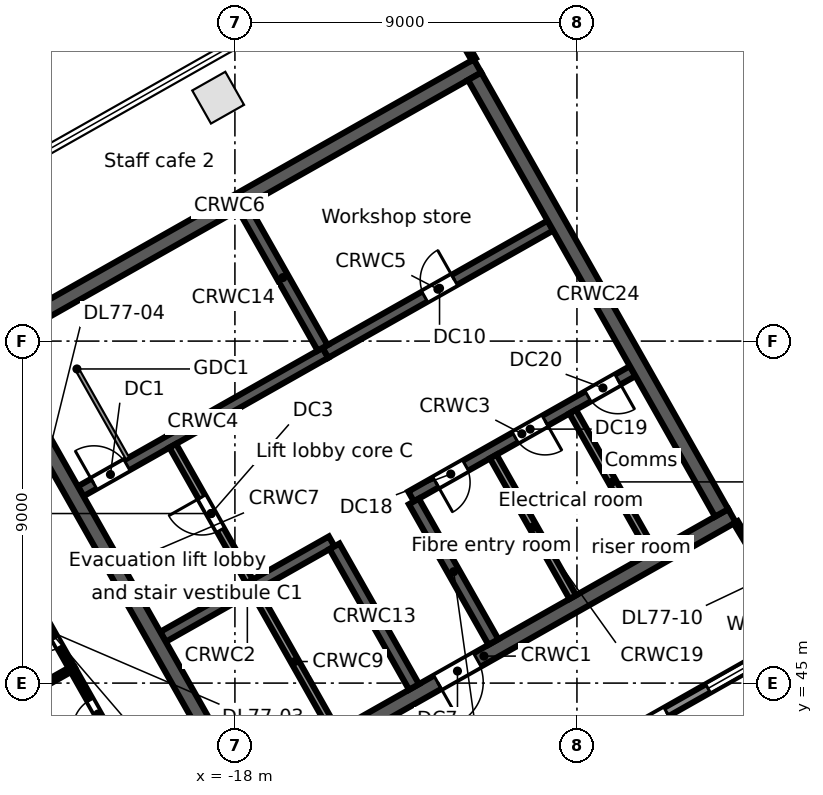
"""IFC4 building model, lengths in metres.
Left out: names, types, materials, properties, quantities, classifications, styles, units other than length and angle.
Written with IfcOpenShell. Run it as: python <this file> out.ifc"""

import sys

from ifc_helpers import new_model, si_unit, direction, frame, frame_2d, origin, origin_2d, place, context, subcontext, project, spatial, rectangle, extrude, element, fill, save


model = new_model("IFC4")
c1 = context("Model", 3, precision=1e-05, world=origin(), true_north=direction((0.0, 1.0)))
c2 = subcontext(c1, "Body", "Model", "MODEL_VIEW")
j1 = project(units=[si_unit("LENGTHUNIT", "METRE"), si_unit("PLANEANGLEUNIT", "RADIAN")], contexts=[c1])
p1 = place(None, origin())
s1 = spatial("IfcSite", under=j1, at=p1, CompositionType="ELEMENT")
p2 = place(p1, origin())
s2 = spatial("IfcBuilding", under=s1, at=p2, CompositionType="ELEMENT")
p3 = place(p2, frame((0.0, 0.0, 343.1)))
s3 = spatial("IfcBuildingStorey", under=s2, at=p3, CompositionType="ELEMENT", Elevation=343.1)
p4 = place(p3, frame((-18.441, 60.406, 0.0), z_axis=(0.0, 0.0, 1.0), x_axis=(-0.87035569594, -0.492423560103, 0.0)))
e1 = element("IfcColumn", 1, at=p4, inside=s3, PredefinedType="COLUMN", context=c2, shape_type="SweptSolid", body=[
    extrude(rectangle(XDim=1.0, YDim=1.0, at=origin_2d()), origin(), (0.0, 0.0, 1.0), 3.5),
])
p5 = place(p3, frame((-3.017, 46.293, 0.0), z_axis=(0.0, 0.0, 1.0), x_axis=(-0.870355474887, -0.492423950812, 0.0)))
e2 = element("IfcWall", 2, at=p5, inside=s3, PredefinedType="STANDARD", context=c2, shape_type="SweptSolid", body=[
    extrude(rectangle(XDim=40.34, YDim=0.25, at=frame_2d((20.17, 0.0))), origin(), (0.0, 0.0, 1.0), 3.5),
])
p6 = place(p5, frame((37.428, 0.0, 0.8)))
e3 = element("IfcOpeningElement", 3, at=p6, cuts=e2, PredefinedType="OPENING", context=c2, shape_type="SweptSolid", body=[
    extrude(rectangle(XDim=2.4, YDim=2.2, at=frame_2d((1.2, 1.1))), frame((0.0, 0.135, 0.0), z_axis=(0.0, -1.0, 0.0), x_axis=(1.0, 0.0, 0.0)), (0.0, 0.0, 1.0), 0.27),
])
p7 = place(p5, frame((34.372, 0.0, 0.0)))
e4 = element("IfcOpeningElement", 4, at=p7, cuts=e2, PredefinedType="OPENING", context=c2, shape_type="SweptSolid", body=[
    extrude(rectangle(XDim=1.8, YDim=2.4, at=frame_2d((0.9, 1.2))), frame((0.0, 0.135, 0.0), z_axis=(0.0, -1.0, 0.0), x_axis=(1.0, 0.0, 0.0)), (0.0, 0.0, 1.0), 0.27),
])
p8 = place(p5, frame((30.716, 0.0, 0.8)))
e5 = element("IfcOpeningElement", 5, at=p8, cuts=e2, PredefinedType="OPENING", context=c2, shape_type="SweptSolid", body=[
    extrude(rectangle(XDim=2.4, YDim=2.2, at=frame_2d((1.2, 1.1))), frame((0.0, 0.135, 0.0), z_axis=(0.0, -1.0, 0.0), x_axis=(1.0, 0.0, 0.0)), (0.0, 0.0, 1.0), 0.27),
])
p9 = place(p5, frame((27.36, 0.0, 0.8)))
e6 = element("IfcOpeningElement", 6, at=p9, cuts=e2, PredefinedType="OPENING", context=c2, shape_type="SweptSolid", body=[
    extrude(rectangle(XDim=2.4, YDim=2.2, at=frame_2d((1.2, 1.1))), frame((0.0, 0.135, 0.0), z_axis=(0.0, -1.0, 0.0), x_axis=(1.0, 0.0, 0.0)), (0.0, 0.0, 1.0), 0.27),
])
p10 = place(p5, frame((24.304, 0.0, 0.0)))
e7 = element("IfcOpeningElement", 7, at=p10, cuts=e2, PredefinedType="OPENING", context=c2, shape_type="SweptSolid", body=[
    extrude(rectangle(XDim=1.8, YDim=2.4, at=frame_2d((0.9, 1.2))), frame((0.0, 0.135, 0.0), z_axis=(0.0, -1.0, 0.0), x_axis=(1.0, 0.0, 0.0)), (0.0, 0.0, 1.0), 0.27),
])
p11 = place(p5, frame((20.648, 0.0, 0.8)))
e8 = element("IfcOpeningElement", 8, at=p11, cuts=e2, PredefinedType="OPENING", context=c2, shape_type="SweptSolid", body=[
    extrude(rectangle(XDim=2.4, YDim=2.2, at=frame_2d((1.2, 1.1))), frame((0.0, 0.135, 0.0), z_axis=(0.0, -1.0, 0.0), x_axis=(1.0, 0.0, 0.0)), (0.0, 0.0, 1.0), 0.27),
])
p12 = place(p5, frame((17.292, 0.0, 0.8)))
e9 = element("IfcOpeningElement", 9, at=p12, cuts=e2, PredefinedType="OPENING", context=c2, shape_type="SweptSolid", body=[
    extrude(rectangle(XDim=2.4, YDim=2.2, at=frame_2d((1.2, 1.1))), frame((0.0, 0.135, 0.0), z_axis=(0.0, -1.0, 0.0), x_axis=(1.0, 0.0, 0.0)), (0.0, 0.0, 1.0), 0.27),
])
p13 = place(p5, frame((14.236, 0.0, 0.0)))
e10 = element("IfcOpeningElement", 10, at=p13, cuts=e2, PredefinedType="OPENING", context=c2, shape_type="SweptSolid", body=[
    extrude(rectangle(XDim=1.8, YDim=2.4, at=frame_2d((0.9, 1.2))), frame((0.0, 0.135, 0.0), z_axis=(0.0, -1.0, 0.0), x_axis=(1.0, 0.0, 0.0)), (0.0, 0.0, 1.0), 0.27),
])
p14 = place(p5, frame((10.58, 0.0, 0.8)))
e11 = element("IfcOpeningElement", 11, at=p14, cuts=e2, PredefinedType="OPENING", context=c2, shape_type="SweptSolid", body=[
    extrude(rectangle(XDim=2.4, YDim=2.2, at=frame_2d((1.2, 1.1))), frame((0.0, 0.135, 0.0), z_axis=(0.0, -1.0, 0.0), x_axis=(1.0, 0.0, 0.0)), (0.0, 0.0, 1.0), 0.27),
])
p15 = place(p5, frame((7.224, 0.0, 0.8)))
e12 = element("IfcOpeningElement", 12, at=p15, cuts=e2, PredefinedType="OPENING", context=c2, shape_type="SweptSolid", body=[
    extrude(rectangle(XDim=2.4, YDim=2.2, at=frame_2d((1.2, 1.1))), frame((0.0, 0.135, 0.0), z_axis=(0.0, -1.0, 0.0), x_axis=(1.0, 0.0, 0.0)), (0.0, 0.0, 1.0), 0.27),
])
p16 = place(p5, frame((4.168, 0.0, 0.0)))
e13 = element("IfcOpeningElement", 13, at=p16, cuts=e2, PredefinedType="OPENING", context=c2, shape_type="SweptSolid", body=[
    extrude(rectangle(XDim=1.8, YDim=2.4, at=frame_2d((0.9, 1.2))), frame((0.0, 0.135, 0.0), z_axis=(0.0, -1.0, 0.0), x_axis=(1.0, 0.0, 0.0)), (0.0, 0.0, 1.0), 0.27),
])
p17 = place(p5, frame((0.512, 0.0, 0.8)))
e14 = element("IfcOpeningElement", 14, at=p17, cuts=e2, PredefinedType="OPENING", context=c2, shape_type="SweptSolid", body=[
    extrude(rectangle(XDim=2.4, YDim=2.2, at=frame_2d((1.2, 1.1))), frame((0.0, 0.135, 0.0), z_axis=(0.0, -1.0, 0.0), x_axis=(1.0, 0.0, 0.0)), (0.0, 0.0, 1.0), 0.27),
])
p18 = place(p3, frame((-17.975, 42.017, 0.0), z_axis=(0.0, 0.0, 1.0), x_axis=(0.87034965173, 0.492434243055, 0.0)))
e15 = element("IfcWall", 15, at=p18, inside=s3, PredefinedType="SOLIDWALL", context=c2, shape_type="SweptSolid", body=[
    extrude(rectangle(XDim=15.0, YDim=0.4, at=frame_2d((7.5, 0.0))), origin(), (0.0, 0.0, 1.0), 3.5),
])
p19 = place(p18, frame((6.1, 0.0, 0.0)))
e16 = element("IfcOpeningElement", 16, at=p19, cuts=e15, PredefinedType="OPENING", context=c2, shape_type="SweptSolid", body=[
    extrude(rectangle(XDim=1.2, YDim=2.1, at=frame_2d((0.6, 1.05))), frame((0.0, 0.21, 0.0), z_axis=(0.0, -1.0, 0.0), x_axis=(1.0, 0.0, 0.0)), (0.0, 0.0, 1.0), 0.42),
])
p20 = place(p3, frame((-19.892, 46.218, 0.0), z_axis=(0.0, 0.0, 1.0), x_axis=(0.870341639186, 0.492448404505, 0.0)))
e17 = element("IfcWall", 17, at=p20, inside=s3, PredefinedType="SOLIDWALL", context=c2, shape_type="SweptSolid", body=[
    extrude(rectangle(XDim=5.1, YDim=0.3, at=frame_2d((2.55, 0.0))), origin(), (0.0, 0.0, 1.0), 3.5),
])
p21 = place(p3, frame((-13.365, 49.911, 0.0), z_axis=(0.0, 0.0, 1.0), x_axis=(0.870347618718, 0.492437836272, 0.0)))
e18 = element("IfcWall", 18, at=p21, inside=s3, PredefinedType="SOLIDWALL", context=c2, shape_type="SweptSolid", body=[
    extrude(rectangle(XDim=6.7, YDim=0.3, at=frame_2d((3.35, 0.0))), origin(), (0.0, 0.0, 1.0), 3.5),
])
p22 = place(p21, frame((0.75, 0.0, 0.0)))
e19 = element("IfcOpeningElement", 19, at=p22, cuts=e18, PredefinedType="OPENING", context=c2, shape_type="SweptSolid", body=[
    extrude(rectangle(XDim=0.9, YDim=2.1, at=frame_2d((0.45, 1.05))), frame((0.0, 0.16, 0.0), z_axis=(0.0, -1.0, 0.0), x_axis=(1.0, 0.0, 0.0)), (0.0, 0.0, 1.0), 0.32),
])
p23 = place(p21, frame((3.15, 0.0, 0.0)))
e20 = element("IfcOpeningElement", 20, at=p23, cuts=e18, PredefinedType="OPENING", context=c2, shape_type="SweptSolid", body=[
    extrude(rectangle(XDim=0.9, YDim=2.1, at=frame_2d((0.45, 1.05))), frame((0.0, 0.16, 0.0), z_axis=(0.0, -1.0, 0.0), x_axis=(1.0, 0.0, 0.0)), (0.0, 0.0, 1.0), 0.32),
])
p24 = place(p21, frame((5.35, 0.0, 0.0)))
e21 = element("IfcOpeningElement", 21, at=p24, cuts=e18, PredefinedType="OPENING", context=c2, shape_type="SweptSolid", body=[
    extrude(rectangle(XDim=0.9, YDim=2.1, at=frame_2d((0.45, 1.05))), frame((0.0, 0.16, 0.0), z_axis=(0.0, -1.0, 0.0), x_axis=(1.0, 0.0, 0.0)), (0.0, 0.0, 1.0), 0.32),
])
p25 = place(p3, frame((-22.059, 50.047, 0.0), z_axis=(0.0, 0.0, 1.0), x_axis=(0.87035077051, 0.49243226567, 0.0)))
e22 = element("IfcWall", 22, at=p25, inside=s3, PredefinedType="SOLIDWALL", context=c2, shape_type="SweptSolid", body=[
    extrude(rectangle(XDim=7.4, YDim=0.3, at=frame_2d((3.7, 0.0))), origin(), (0.0, 0.0, 1.0), 3.5),
])
p26 = place(p25, frame((0.4, 0.0, 0.0)))
e23 = element("IfcOpeningElement", 23, at=p26, cuts=e22, PredefinedType="OPENING", context=c2, shape_type="SweptSolid", body=[
    extrude(rectangle(XDim=1.0, YDim=2.1, at=frame_2d((0.5, 1.05))), frame((0.0, 0.16, 0.0), z_axis=(0.0, -1.0, 0.0), x_axis=(1.0, 0.0, 0.0)), (0.0, 0.0, 1.0), 0.32),
])
p27 = place(p3, frame((-15.618, 53.691, 0.0), z_axis=(0.0, 0.0, 1.0), x_axis=(0.870362830851, 0.492410948978, 0.0)))
e24 = element("IfcWall", 24, at=p27, inside=s3, PredefinedType="SOLIDWALL", context=c2, shape_type="SweptSolid", body=[
    extrude(rectangle(XDim=6.8, YDim=0.3, at=frame_2d((3.4, 0.0))), origin(), (0.0, 0.0, 1.0), 3.5),
])
p28 = place(p27, frame((3.0, 0.0, 0.0)))
e25 = element("IfcOpeningElement", 25, at=p28, cuts=e24, PredefinedType="OPENING", context=c2, shape_type="SweptSolid", body=[
    extrude(rectangle(XDim=0.9, YDim=2.1, at=frame_2d((0.45, 1.05))), frame((0.0, 0.16, 0.0), z_axis=(0.0, -1.0, 0.0), x_axis=(1.0, 0.0, 0.0)), (0.0, 0.0, 1.0), 0.32),
])
p29 = place(p3, frame((-24.672, 53.854, 0.0), z_axis=(0.0, 0.0, 1.0), x_axis=(0.870353598469, 0.492427267353, 0.0)))
e26 = element("IfcWall", 26, at=p29, inside=s3, PredefinedType="SOLIDWALL", context=c2, shape_type="SweptSolid", body=[
    extrude(rectangle(XDim=15.0, YDim=0.4, at=frame_2d((7.5, 0.0))), origin(), (0.0, 0.0, 1.0), 3.5),
])
p30 = place(p3, frame((-24.4, 53.779, 0.0), z_axis=(0.0, 0.0, 1.0), x_axis=(0.492421663121, -0.870356769198, 0.0)))
e27 = element("IfcWall", 27, at=p30, inside=s3, PredefinedType="SOLIDWALL", context=c2, shape_type="SweptSolid", body=[
    extrude(rectangle(XDim=13.2, YDim=0.4, at=frame_2d((6.6, 0.0))), origin(), (0.0, 0.0, 1.0), 3.5),
])
p31 = place(p3, frame((-17.469, 47.417, 0.0), z_axis=(0.0, 0.0, 1.0), x_axis=(0.492466057713, -0.870331650579, 0.0)))
e28 = element("IfcWall", 28, at=p31, inside=s3, PredefinedType="SOLIDWALL", context=c2, shape_type="SweptSolid", body=[
    extrude(rectangle(XDim=4.25, YDim=0.2, at=frame_2d((2.125, 0.0))), origin(), (0.0, 0.0, 1.0), 3.5),
])
p32 = place(p3, frame((-19.635, 51.246, 0.0), z_axis=(0.0, 0.0, 1.0), x_axis=(0.492408451753, -0.87036424366, 0.0)))
e29 = element("IfcWall", 29, at=p32, inside=s3, PredefinedType="PARTITIONING", context=c2, shape_type="SweptSolid", body=[
    extrude(rectangle(XDim=4.1, YDim=0.2, at=frame_2d((2.05, 0.0))), origin(), (0.0, 0.0, 1.0), 3.5),
])
p33 = place(p32, frame((1.55, 0.0, 0.0)))
e30 = element("IfcOpeningElement", 30, at=p33, cuts=e29, PredefinedType="OPENING", context=c2, shape_type="SweptSolid", body=[
    extrude(rectangle(XDim=1.0, YDim=2.1, at=frame_2d((0.5, 1.05))), frame((0.0, 0.11, 0.0), z_axis=(0.0, -1.0, 0.0), x_axis=(1.0, 0.0, 0.0)), (0.0, 0.0, 1.0), 0.22),
])
for number, where, z_axis, x_axis in (
    (31, (-15.379, 48.599, 0.0), (0.0, 0.0, 1.0), (0.492, -0.87, 0.0)),
    (32, (-17.785, 57.521, 0.0), (0.0, 0.0, 1.0), (0.492, -0.87, 0.0)),
):
    element("IfcWall", number, at=place(p3, frame(where, z_axis=z_axis, x_axis=x_axis)), inside=s3, PredefinedType="SOLIDWALL", context=c2, shape_type="SweptSolid", body=[
        extrude(rectangle(XDim=4.25, YDim=0.3, at=frame_2d((2.125, 0.0))), origin(), (0.0, 0.0, 1.0), 3.5),
    ])
p34 = place(p3, frame((-13.291, 49.781, 0.0), z_axis=(0.0, 0.0, 1.0), x_axis=(0.492397924348, -0.870370199454, 0.0)))
e33 = element("IfcWall", 33, at=p34, inside=s3, PredefinedType="SOLIDWALL", context=c2, shape_type="SweptSolid", body=[
    extrude(rectangle(XDim=4.25, YDim=0.3, at=frame_2d((2.125, 0.0))), origin(), (0.0, 0.0, 1.0), 3.5),
])
p35 = place(p3, frame((-11.202, 50.962, 0.0), z_axis=(0.0, 0.0, 1.0), x_axis=(0.492441437811, -0.870345580977, 0.0)))
e34 = element("IfcWall", 34, at=p35, inside=s3, PredefinedType="PARTITIONING", context=c2, shape_type="SweptSolid", body=[
    extrude(rectangle(XDim=4.25, YDim=0.2, at=frame_2d((2.125, 0.0))), origin(), (0.0, 0.0, 1.0), 3.5),
])
p36 = place(p3, frame((-9.113, 52.144, 0.0), z_axis=(0.0, 0.0, 1.0), x_axis=(0.492422543467, -0.870356271124, 0.0)))
e35 = element("IfcWall", 35, at=p36, inside=s3, PredefinedType="PARTITIONING", context=c2, shape_type="SweptSolid", body=[
    extrude(rectangle(XDim=4.25, YDim=0.2, at=frame_2d((2.125, 0.0))), origin(), (0.0, 0.0, 1.0), 3.5),
])
p37 = place(p3, frame((-11.692, 60.968, 0.0), z_axis=(0.0, 0.0, 1.0), x_axis=(0.492421663121, -0.870356769198, 0.0)))
e36 = element("IfcWall", 36, at=p37, inside=s3, PredefinedType="SOLIDWALL", context=c2, shape_type="SweptSolid", body=[
    extrude(rectangle(XDim=13.2, YDim=0.4, at=frame_2d((6.6, 0.0))), origin(), (0.0, 0.0, 1.0), 3.5),
])
p38 = place(p3, frame((-27.504, 42.428, 0.0), z_axis=(0.0, 0.0, 1.0), x_axis=(0.870308850352, 0.492506350211, 0.0)))
e37 = element("IfcWall", 37, at=p38, inside=s3, PredefinedType="PARTITIONING", context=c2, shape_type="SweptSolid", body=[
    extrude(rectangle(XDim=6.0, YDim=0.125, at=frame_2d((3.0, 0.0))), origin(), (0.0, 0.0, 1.0), 2.88),
])
p39 = place(p3, frame((-23.267, 47.124, 0.0), z_axis=(0.0, 0.0, 1.0), x_axis=(0.492467412326, -0.870330884088, 0.0)))
e38 = element("IfcWall", 38, at=p39, inside=s3, PredefinedType="PARTITIONING", context=c2, shape_type="SweptSolid", body=[
    extrude(rectangle(XDim=2.0, YDim=0.15, at=frame_2d((1.0, 0.0))), origin(), (0.0, 0.0, 1.0), 2.88),
])
p40 = place(p39, frame((0.45, 0.0, 0.0)))
e39 = element("IfcOpeningElement", 39, at=p40, cuts=e38, PredefinedType="OPENING", context=c2, shape_type="SweptSolid", body=[
    extrude(rectangle(XDim=0.9, YDim=2.1, at=frame_2d((0.45, 1.05))), frame((0.0, 0.085, 0.0), z_axis=(0.0, -1.0, 0.0), x_axis=(1.0, 0.0, 0.0)), (0.0, 0.0, 1.0), 0.17),
])
p41 = place(p3, frame((-22.282, 45.383, 0.0), z_axis=(0.0, 0.0, 1.0), x_axis=(0.492560173591, -0.870278389592, 0.0)))
e40 = element("IfcWall", 40, at=p41, inside=s3, PredefinedType="PARTITIONING", context=c2, shape_type="SweptSolid", body=[
    extrude(rectangle(XDim=2.751, YDim=0.15, at=frame_2d((1.375, 0.0))), origin(), (0.0, 0.0, 1.0), 3.5),
])
p42 = place(p41, frame((0.95, 0.0, 0.0)))
e41 = element("IfcOpeningElement", 41, at=p42, cuts=e40, PredefinedType="OPENING", context=c2, shape_type="SweptSolid", body=[
    extrude(rectangle(XDim=0.9, YDim=2.1, at=frame_2d((0.45, 1.05))), frame((0.0, 0.085, 0.0), z_axis=(0.0, -1.0, 0.0), x_axis=(1.0, 0.0, 0.0)), (0.0, 0.0, 1.0), 0.17),
])
p43 = place(p3, frame((-13.382, 64.36, 0.0), z_axis=(0.0, 0.0, 1.0), x_axis=(0.492468354667, -0.870330350874, 0.0)))
e42 = element("IfcWall", 42, at=p43, inside=s3, PredefinedType="PARTITIONING", context=c2, shape_type="SweptSolid", body=[
    extrude(rectangle(XDim=3.385, YDim=0.125, at=frame_2d((1.692, 0.0))), origin(), (0.0, 0.0, 1.0), 2.38),
])
p44 = place(p3, frame((-4.821, 49.23, 0.0), z_axis=(0.0, 0.0, 1.0), x_axis=(0.515006587647, -0.857186219371, 0.0)))
e43 = element("IfcWall", 43, at=p44, inside=s3, PredefinedType="PARTITIONING", context=c2, shape_type="SweptSolid", body=[
    extrude(rectangle(XDim=3.303, YDim=0.125, at=frame_2d((1.651, 0.0))), origin(), (0.0, 0.0, 1.0), 2.88),
])
p45 = place(p44, frame((1.2, 0.0, 0.0)))
e44 = element("IfcOpeningElement", 44, at=p45, cuts=e43, PredefinedType="OPENING", context=c2, shape_type="SweptSolid", body=[
    extrude(rectangle(XDim=0.9, YDim=2.1, at=frame_2d((0.45, 1.05))), frame((0.0, 0.073, 0.0), z_axis=(0.0, -1.0, 0.0), x_axis=(1.0, 0.0, 0.0)), (0.0, 0.0, 1.0), 0.145),
])
p46 = place(p16, origin())
e45 = element("IfcDoor", 45, at=p46, inside=s3, OperationType="DOUBLE_DOOR_SINGLE_SWING", PredefinedType="DOOR", context=c2, shape_type="SweptSolid", body=[
    extrude(rectangle(XDim=1.8, YDim=2.4, at=frame_2d((0.9, 1.2))), frame((0.0, 0.025, 0.0), z_axis=(0.0, -1.0, 0.0), x_axis=(1.0, 0.0, 0.0)), (0.0, 0.0, 1.0), 0.05),
])
fill(e13, e45)
p47 = place(p17, origin())
e46 = element("IfcWindow", 46, at=p47, inside=s3, PartitioningType="SINGLE_PANEL", PredefinedType="WINDOW", context=c2, shape_type="SweptSolid", body=[
    extrude(rectangle(XDim=2.4, YDim=2.2, at=frame_2d((1.2, 1.1))), frame((0.0, 0.03, 0.0), z_axis=(0.0, -1.0, 0.0), x_axis=(1.0, 0.0, 0.0)), (0.0, 0.0, 1.0), 0.06),
])
fill(e14, e46)
p48 = place(p26, origin())
e47 = element("IfcDoor", 47, at=p48, inside=s3, OperationType="SINGLE_SWING_LEFT", PredefinedType="DOOR", context=c2, shape_type="SweptSolid", body=[
    extrude(rectangle(XDim=1.0, YDim=2.1, at=frame_2d((0.5, 1.05))), frame((0.0, 0.025, 0.0), z_axis=(0.0, -1.0, 0.0), x_axis=(1.0, 0.0, 0.0)), (0.0, 0.0, 1.0), 0.05),
])
fill(e23, e47)
p49 = place(p33, frame((1.0, 0.0, 0.0), z_axis=(0.0, 0.0, 1.0), x_axis=(-1.0, 0.0, 0.0)))
e48 = element("IfcDoor", 48, at=p49, inside=s3, OperationType="SINGLE_SWING_RIGHT", PredefinedType="DOOR", context=c2, shape_type="SweptSolid", body=[
    extrude(rectangle(XDim=1.0, YDim=2.1, at=frame_2d((0.5, 1.05))), frame((0.0, 0.025, 0.0), z_axis=(0.0, -1.0, 0.0), x_axis=(1.0, 0.0, 0.0)), (0.0, 0.0, 1.0), 0.05),
])
fill(e30, e48)
p50 = place(p19, frame((1.2, 0.0, 0.0), z_axis=(0.0, 0.0, 1.0), x_axis=(-1.0, 0.0, 0.0)))
e49 = element("IfcDoor", 49, at=p50, inside=s3, OperationType="SINGLE_SWING_RIGHT", PredefinedType="DOOR", context=c2, shape_type="SweptSolid", body=[
    extrude(rectangle(XDim=1.2, YDim=2.1, at=frame_2d((0.6, 1.05))), frame((0.0, 0.025, 0.0), z_axis=(0.0, -1.0, 0.0), x_axis=(1.0, 0.0, 0.0)), (0.0, 0.0, 1.0), 0.05),
])
fill(e16, e49)
p51 = place(p28, origin())
e50 = element("IfcDoor", 50, at=p51, inside=s3, OperationType="SINGLE_SWING_RIGHT", PredefinedType="DOOR", context=c2, shape_type="SweptSolid", body=[
    extrude(rectangle(XDim=0.9, YDim=2.1, at=frame_2d((0.45, 1.05))), frame((0.0, 0.025, 0.0), z_axis=(0.0, -1.0, 0.0), x_axis=(1.0, 0.0, 0.0)), (0.0, 0.0, 1.0), 0.05),
])
fill(e25, e50)
p52 = place(p22, frame((0.9, 0.0, 0.0), z_axis=(0.0, 0.0, 1.0), x_axis=(-1.0, 0.0, 0.0)))
e51 = element("IfcDoor", 51, at=p52, inside=s3, OperationType="SINGLE_SWING_RIGHT", PredefinedType="DOOR", context=c2, shape_type="SweptSolid", body=[
    extrude(rectangle(XDim=0.9, YDim=2.1, at=frame_2d((0.45, 1.05))), frame((0.0, 0.025, 0.0), z_axis=(0.0, -1.0, 0.0), x_axis=(1.0, 0.0, 0.0)), (0.0, 0.0, 1.0), 0.05),
])
fill(e19, e51)
p53 = place(p23, frame((0.9, 0.0, 0.0), z_axis=(0.0, 0.0, 1.0), x_axis=(-1.0, 0.0, 0.0)))
e52 = element("IfcDoor", 52, at=p53, inside=s3, OperationType="SINGLE_SWING_LEFT", PredefinedType="DOOR", context=c2, shape_type="SweptSolid", body=[
    extrude(rectangle(XDim=0.9, YDim=2.1, at=frame_2d((0.45, 1.05))), frame((0.0, 0.025, 0.0), z_axis=(0.0, -1.0, 0.0), x_axis=(1.0, 0.0, 0.0)), (0.0, 0.0, 1.0), 0.05),
])
fill(e20, e52)
p54 = place(p24, frame((0.9, 0.0, 0.0), z_axis=(0.0, 0.0, 1.0), x_axis=(-1.0, 0.0, 0.0)))
e53 = element("IfcDoor", 53, at=p54, inside=s3, OperationType="SINGLE_SWING_LEFT", PredefinedType="DOOR", context=c2, shape_type="SweptSolid", body=[
    extrude(rectangle(XDim=0.9, YDim=2.1, at=frame_2d((0.45, 1.05))), frame((0.0, 0.025, 0.0), z_axis=(0.0, -1.0, 0.0), x_axis=(1.0, 0.0, 0.0)), (0.0, 0.0, 1.0), 0.05),
])
fill(e21, e53)
p55 = place(p42, frame((0.9, 0.0, 0.0), z_axis=(0.0, 0.0, 1.0), x_axis=(-1.0, 0.0, 0.0)))
e54 = element("IfcDoor", 54, at=p55, inside=s3, OperationType="SINGLE_SWING_LEFT", PredefinedType="DOOR", context=c2, shape_type="SweptSolid", body=[
    extrude(rectangle(XDim=0.9, YDim=2.1, at=frame_2d((0.45, 1.05))), frame((0.0, 0.025, 0.0), z_axis=(0.0, -1.0, 0.0), x_axis=(1.0, 0.0, 0.0)), (0.0, 0.0, 1.0), 0.05),
])
fill(e41, e54)
p56 = place(p40, frame((0.9, 0.0, 0.0), z_axis=(0.0, 0.0, 1.0), x_axis=(-1.0, 0.0, 0.0)))
e55 = element("IfcDoor", 55, at=p56, inside=s3, OperationType="SINGLE_SWING_RIGHT", PredefinedType="DOOR", context=c2, shape_type="SweptSolid", body=[
    extrude(rectangle(XDim=0.9, YDim=2.1, at=frame_2d((0.45, 1.05))), frame((0.0, 0.025, 0.0), z_axis=(0.0, -1.0, 0.0), x_axis=(1.0, 0.0, 0.0)), (0.0, 0.0, 1.0), 0.05),
])
fill(e39, e55)
save(model, sys.argv[1])
